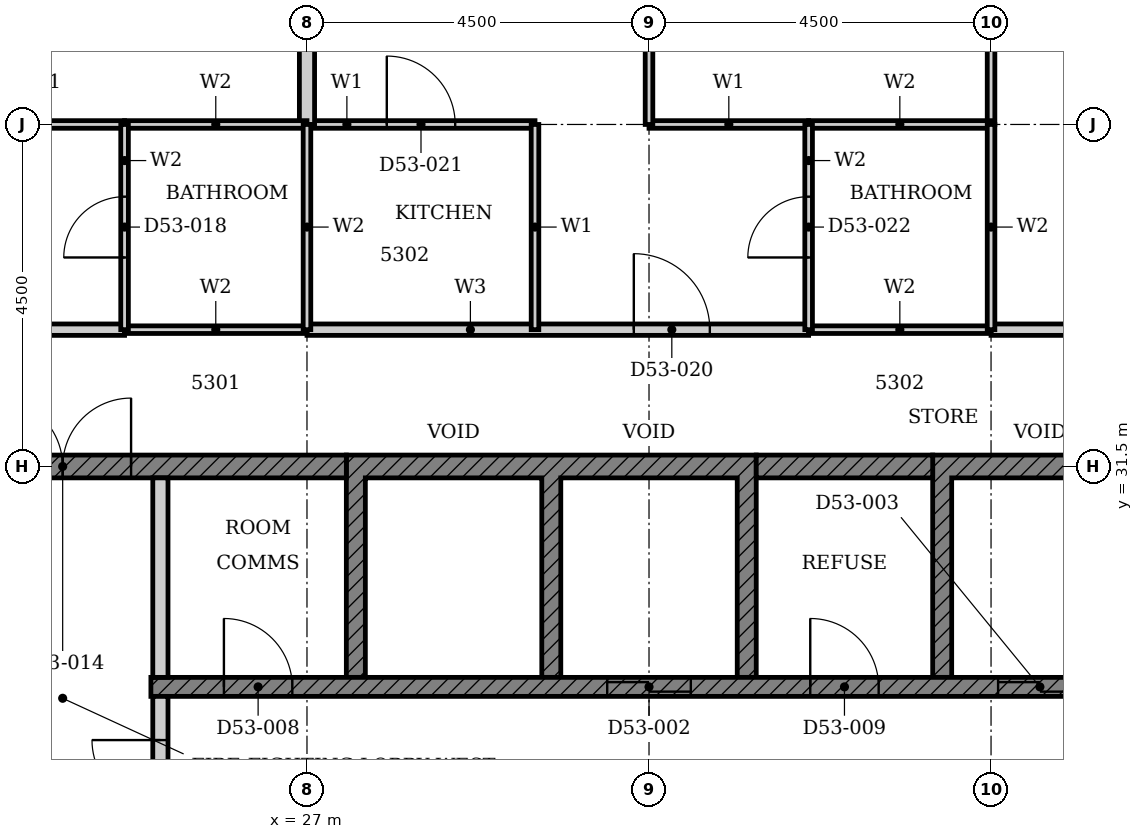
"""IFC4 building model, lengths in metres.
Left out: names, types, materials, properties, quantities, classifications, styles, units other than length and angle.
Written with IfcOpenShell. Run it as: python <this file> out.ifc"""

import sys

from ifc_helpers import new_model, si_unit, direction, frame, frame_2d, origin, place, context, subcontext, project, spatial, polyline, rectangle, outline, extrude, element, fill, save


model = new_model("IFC4")
c1 = context("Model", 3, precision=1e-05, world=origin(), true_north=direction((0.0, 1.0)))
c2 = subcontext(c1, "Body", "Model", "MODEL_VIEW")
j1 = project(units=[si_unit("LENGTHUNIT", "METRE"), si_unit("PLANEANGLEUNIT", "RADIAN")], contexts=[c1])
p1 = place(None, origin())
s1 = spatial("IfcSite", under=j1, at=p1, CompositionType="ELEMENT")
p2 = place(p1, origin())
s2 = spatial("IfcBuilding", under=s1, at=p2, CompositionType="ELEMENT")
p3 = place(p2, frame((0.0, 0.0, 210.9)))
s3 = spatial("IfcBuildingStorey", under=s2, at=p3, CompositionType="ELEMENT", Elevation=210.9)
p4 = place(p3, origin())
e1 = element("IfcWall", 1, at=p4, inside=s3, PredefinedType="SHEAR", context=c2, shape_type="SweptSolid", body=[
    extrude(outline(polyline([(27.518, 28.725), (27.768, 28.725), (27.768, 31.35), (30.089, 31.35), (30.089, 28.725), (30.339, 28.725), (30.339, 31.35), (32.661, 31.35), (32.661, 28.725), (32.911, 28.725), (32.911, 31.65), (27.518, 31.65), (27.518, 28.725)])), origin(), (0.0, 0.0, 1.0), 3.4),
])
p5 = place(p3, origin())
e2 = element("IfcWall", 2, at=p5, inside=s3, PredefinedType="SHEAR", context=c2, shape_type="SweptSolid", body=[
    extrude(outline(polyline([(35.232, 28.725), (35.482, 28.725), (35.482, 31.35), (37.803, 31.35), (37.803, 28.725), (38.053, 28.725), (38.053, 31.35), (40.375, 31.35), (40.375, 28.725), (40.625, 28.725), (40.625, 31.65), (35.232, 31.65), (35.232, 28.725)])), origin(), (0.0, 0.0, 1.0), 3.4),
])
p6 = place(p3, frame((18.15, 31.5, 0.0), z_axis=(0.0, 0.0, 1.0), x_axis=(1.0, 0.0, 0.0)))
e3 = element("IfcWall", 3, at=p6, inside=s3, PredefinedType="SHEAR", context=c2, shape_type="SweptSolid", body=[
    extrude(rectangle(XDim=9.368, YDim=0.3, at=frame_2d((4.684, 0.0))), origin(), (0.0, 0.0, 1.0), 3.4),
])
p7 = place(p6, frame((4.736, 0.0, 0.0)))
e4 = element("IfcOpeningElement", 4, at=p7, cuts=e3, PredefinedType="OPENING", context=c2, shape_type="SweptSolid", body=[
    extrude(rectangle(XDim=1.8, YDim=2.1, at=frame_2d((0.9, 1.05))), frame((0.0, 0.16, 0.0), z_axis=(0.0, -1.0, 0.0), x_axis=(1.0, 0.0, 0.0)), (0.0, 0.0, 1.0), 0.32),
])
p8 = place(p3, frame((32.911, 31.5, 0.0), z_axis=(0.0, 0.0, 1.0), x_axis=(1.0, 0.0, 0.0)))
e5 = element("IfcWall", 5, at=p8, inside=s3, PredefinedType="SHEAR", context=c2, shape_type="SweptSolid", body=[
    extrude(rectangle(XDim=2.322, YDim=0.3, at=frame_2d((1.161, 0.0))), origin(), (0.0, 0.0, 1.0), 3.4),
])
p9 = place(p3, frame((24.947, 28.6, 0.0), z_axis=(0.0, 0.0, 1.0), x_axis=(1.0, 0.0, 0.0)))
e6 = element("IfcWall", 6, at=p9, inside=s3, PredefinedType="SHEAR", context=c2, shape_type="SweptSolid", body=[
    extrude(rectangle(XDim=15.678, YDim=0.25, at=frame_2d((7.839, 0.0))), origin(), (0.0, 0.0, 1.0), 3.4),
])
p10 = place(p9, frame((6.004, 0.0, 0.0)))
e7 = element("IfcOpeningElement", 7, at=p10, cuts=e6, PredefinedType="OPENING", context=c2, shape_type="SweptSolid", body=[
    extrude(rectangle(XDim=1.1, YDim=2.1, at=frame_2d((0.55, 1.05))), frame((0.0, 0.135, 0.0), z_axis=(0.0, -1.0, 0.0), x_axis=(1.0, 0.0, 0.0)), (0.0, 0.0, 1.0), 0.27),
])
p11 = place(p9, frame((11.146, 0.0, 0.0)))
e8 = element("IfcOpeningElement", 8, at=p11, cuts=e6, PredefinedType="OPENING", context=c2, shape_type="SweptSolid", body=[
    extrude(rectangle(XDim=1.1, YDim=2.1, at=frame_2d((0.55, 1.05))), frame((0.0, 0.135, 0.0), z_axis=(0.0, -1.0, 0.0), x_axis=(1.0, 0.0, 0.0)), (0.0, 0.0, 1.0), 0.27),
])
p12 = place(p9, frame((13.718, 0.0, 0.0)))
e9 = element("IfcOpeningElement", 9, at=p12, cuts=e6, PredefinedType="OPENING", context=c2, shape_type="SweptSolid", body=[
    extrude(rectangle(XDim=1.1, YDim=2.1, at=frame_2d((0.55, 1.05))), frame((0.0, 0.135, 0.0), z_axis=(0.0, -1.0, 0.0), x_axis=(1.0, 0.0, 0.0)), (0.0, 0.0, 1.0), 0.27),
])
p13 = place(p9, frame((0.961, 0.0, 0.0)))
e10 = element("IfcOpeningElement", 10, at=p13, cuts=e6, PredefinedType="OPENING", context=c2, shape_type="SweptSolid", body=[
    extrude(rectangle(XDim=0.9, YDim=2.1, at=frame_2d((0.45, 1.05))), frame((0.0, 0.135, 0.0), z_axis=(0.0, -1.0, 0.0), x_axis=(1.0, 0.0, 0.0)), (0.0, 0.0, 1.0), 0.27),
])
p14 = place(p9, frame((8.675, 0.0, 0.0)))
e11 = element("IfcOpeningElement", 11, at=p14, cuts=e6, PredefinedType="OPENING", context=c2, shape_type="SweptSolid", body=[
    extrude(rectangle(XDim=0.9, YDim=2.1, at=frame_2d((0.45, 1.05))), frame((0.0, 0.135, 0.0), z_axis=(0.0, -1.0, 0.0), x_axis=(1.0, 0.0, 0.0)), (0.0, 0.0, 1.0), 0.27),
])
p15 = place(p3, frame((25.072, 28.725, 0.0), z_axis=(0.0, 0.0, 1.0), x_axis=(0.0, 1.0, 0.0)))
e12 = element("IfcWall", 12, at=p15, inside=s3, PredefinedType="PARTITIONING", context=c2, shape_type="SweptSolid", body=[
    extrude(rectangle(XDim=2.625, YDim=0.2, at=frame_2d((1.312, 0.0))), origin(), (0.0, 0.0, 1.0), 3.4),
])
p16 = place(p3, frame((25.072, 25.525, 0.0), z_axis=(0.0, 0.0, 1.0), x_axis=(0.0, 1.0, 0.0)))
e13 = element("IfcWall", 13, at=p16, inside=s3, PredefinedType="PARTITIONING", context=c2, shape_type="SweptSolid", body=[
    extrude(rectangle(XDim=2.95, YDim=0.2, at=frame_2d((1.475, 0.0))), origin(), (0.0, 0.0, 1.0), 3.4),
])
p17 = place(p16, frame((0.575, 0.0, 0.0)))
e14 = element("IfcOpeningElement", 14, at=p17, cuts=e13, PredefinedType="OPENING", context=c2, shape_type="SweptSolid", body=[
    extrude(rectangle(XDim=1.8, YDim=2.1, at=frame_2d((0.9, 1.05))), frame((0.0, 0.11, 0.0), z_axis=(0.0, -1.0, 0.0), x_axis=(1.0, 0.0, 0.0)), (0.0, 0.0, 1.0), 0.22),
])
p18 = place(p3, frame((18.0, 33.3, 0.0), z_axis=(0.0, 0.0, 1.0), x_axis=(1.0, 0.0, 0.0)))
e15 = element("IfcWall", 15, at=p18, inside=s3, PredefinedType="PARTITIONING", context=c2, shape_type="SweptSolid", body=[
    extrude(rectangle(XDim=6.6, YDim=0.15, at=frame_2d((3.3, 0.0))), origin(), (0.0, 0.0, 1.0), 3.4),
])
p19 = place(p18, frame((4.3, 0.0, 0.0)))
e16 = element("IfcOpeningElement", 16, at=p19, cuts=e15, PredefinedType="OPENING", context=c2, shape_type="SweptSolid", body=[
    extrude(rectangle(XDim=1.0, YDim=2.2, at=frame_2d((0.5, 1.1))), frame((0.0, 0.085, 0.0), z_axis=(0.0, -1.0, 0.0), x_axis=(1.0, 0.0, 0.0)), (0.0, 0.0, 1.0), 0.17),
])
p20 = place(p3, frame((27.0, 33.3, 0.0), z_axis=(0.0, 0.0, 1.0), x_axis=(1.0, 0.0, 0.0)))
e17 = element("IfcWall", 17, at=p20, inside=s3, PredefinedType="PARTITIONING", context=c2, shape_type="SweptSolid", body=[
    extrude(rectangle(XDim=6.6, YDim=0.15, at=frame_2d((3.3, 0.0))), origin(), (0.0, 0.0, 1.0), 3.4),
])
p21 = place(p20, frame((4.3, 0.0, 0.0)))
e18 = element("IfcOpeningElement", 18, at=p21, cuts=e17, PredefinedType="OPENING", context=c2, shape_type="SweptSolid", body=[
    extrude(rectangle(XDim=1.0, YDim=2.2, at=frame_2d((0.5, 1.1))), frame((0.0, 0.085, 0.0), z_axis=(0.0, -1.0, 0.0), x_axis=(1.0, 0.0, 0.0)), (0.0, 0.0, 1.0), 0.17),
])
p22 = place(p3, frame((36.0, 33.3, 0.0), z_axis=(0.0, 0.0, 1.0), x_axis=(1.0, 0.0, 0.0)))
e19 = element("IfcWall", 19, at=p22, inside=s3, PredefinedType="PARTITIONING", context=c2, shape_type="SweptSolid", body=[
    extrude(rectangle(XDim=9.0, YDim=0.15, at=frame_2d((4.5, 0.0))), origin(), (0.0, 0.0, 1.0), 3.4),
])
p23 = place(p22, frame((4.0, 0.0, 0.0)))
e20 = element("IfcOpeningElement", 20, at=p23, cuts=e19, PredefinedType="OPENING", context=c2, shape_type="SweptSolid", body=[
    extrude(rectangle(XDim=1.0, YDim=2.1, at=frame_2d((0.5, 1.05))), frame((0.0, 0.085, 0.0), z_axis=(0.0, -1.0, 0.0), x_axis=(1.0, 0.0, 0.0)), (0.0, 0.0, 1.0), 0.17),
])
for number, where, z_axis, x_axis in (
    (21, (22.5, 36.0, 0.0), (0.0, 0.0, 1.0), (1.0, 0.0, 0.0)),
    (22, (31.5, 36.0, 0.0), (0.0, 0.0, 1.0), (1.0, 0.0, 0.0)),
):
    element("IfcWall", number, at=place(p3, frame(where, z_axis=z_axis, x_axis=x_axis)), inside=s3, PredefinedType="PARTITIONING", context=c2, shape_type="SweptSolid", body=[
        extrude(rectangle(XDim=2.1, YDim=0.1, at=frame_2d((1.05, 0.0))), origin(), (0.0, 0.0, 1.0), 3.4),
    ])
p24 = place(p3, frame((27.0, 36.0, 0.0), z_axis=(0.0, 0.0, 1.0), x_axis=(1.0, 0.0, 0.0)))
e23 = element("IfcWall", 23, at=p24, inside=s3, PredefinedType="PARTITIONING", context=c2, shape_type="SweptSolid", body=[
    extrude(rectangle(XDim=3.0, YDim=0.1, at=frame_2d((1.5, 0.0))), origin(), (0.0, 0.0, 1.0), 3.4),
])
p25 = place(p24, frame((1.05, 0.0, 0.0)))
e24 = element("IfcOpeningElement", 24, at=p25, cuts=e23, PredefinedType="OPENING", context=c2, shape_type="SweptSolid", body=[
    extrude(rectangle(XDim=0.9, YDim=2.1, at=frame_2d((0.45, 1.05))), frame((0.0, 0.06, 0.0), z_axis=(0.0, -1.0, 0.0), x_axis=(1.0, 0.0, 0.0)), (0.0, 0.0, 1.0), 0.12),
])
p26 = place(p3, frame((30.0, 33.3, 0.0), z_axis=(0.0, 0.0, 1.0), x_axis=(0.0, 1.0, 0.0)))
e25 = element("IfcWall", 25, at=p26, inside=s3, PredefinedType="PARTITIONING", context=c2, shape_type="SweptSolid", body=[
    extrude(rectangle(XDim=2.7, YDim=0.1, at=frame_2d((1.35, 0.0))), origin(), (0.0, 0.0, 1.0), 3.4),
])
p27 = place(p3, frame((31.5, 36.0, 0.0), z_axis=(0.0, 0.0, 1.0), x_axis=(0.0, 1.0, 0.0)))
e26 = element("IfcWall", 26, at=p27, inside=s3, PredefinedType="PARTITIONING", context=c2, shape_type="SweptSolid", body=[
    extrude(rectangle(XDim=4.79, YDim=0.1, at=frame_2d((2.395, 0.0))), origin(), (0.0, 0.0, 1.0), 3.4),
])
p28 = place(p27, frame((1.8, 0.0, 0.0)))
e27 = element("IfcOpeningElement", 27, at=p28, cuts=e26, PredefinedType="OPENING", context=c2, shape_type="SweptSolid", body=[
    extrude(rectangle(XDim=0.9, YDim=2.1, at=frame_2d((0.45, 1.05))), frame((0.0, 0.06, 0.0), z_axis=(0.0, -1.0, 0.0), x_axis=(1.0, 0.0, 0.0)), (0.0, 0.0, 1.0), 0.12),
])
p29 = place(p3, frame((36.0, 36.0, 0.0), z_axis=(0.0, 0.0, 1.0), x_axis=(0.0, 1.0, 0.0)))
e28 = element("IfcWall", 28, at=p29, inside=s3, PredefinedType="PARTITIONING", context=c2, shape_type="SweptSolid", body=[
    extrude(rectangle(XDim=4.69, YDim=0.1, at=frame_2d((2.345, 0.0))), origin(), (0.0, 0.0, 1.0), 3.4),
])
p30 = place(p3, frame((27.0, 36.0, 0.0), z_axis=(0.0, 0.0, 1.0), x_axis=(0.0, 1.0, 0.0)))
e29 = element("IfcWall", 29, at=p30, inside=s3, PredefinedType="PARTITIONING", context=c2, shape_type="SweptSolid", body=[
    extrude(rectangle(XDim=4.69, YDim=0.2, at=frame_2d((2.345, 0.0))), origin(), (0.0, 0.0, 1.0), 3.4),
])
for number, where, z_axis, x_axis in (
    (30, (24.6, 33.3, 0.0), (0.0, 0.0, 1.0), (1.0, 0.0, 0.0)),
    (31, (33.6, 33.3, 0.0), (0.0, 0.0, 1.0), (1.0, 0.0, 0.0)),
    (32, (24.6, 36.0, 0.0), (0.0, 0.0, 1.0), (1.0, 0.0, 0.0)),
    (33, (33.6, 36.0, 0.0), (0.0, 0.0, 1.0), (1.0, 0.0, 0.0)),
):
    element("IfcWall", number, at=place(p3, frame(where, z_axis=z_axis, x_axis=x_axis)), inside=s3, PredefinedType="PARTITIONING", context=c2, shape_type="SweptSolid", body=[
        extrude(rectangle(XDim=2.4, YDim=0.1, at=frame_2d((1.2, 0.0))), origin(), (0.0, 0.0, 1.0), 3.4),
    ])
p31 = place(p3, frame((24.6, 33.3, 0.0), z_axis=(0.0, 0.0, 1.0), x_axis=(0.0, 1.0, 0.0)))
e34 = element("IfcWall", 34, at=p31, inside=s3, PredefinedType="PARTITIONING", context=c2, shape_type="SweptSolid", body=[
    extrude(rectangle(XDim=2.7, YDim=0.1, at=frame_2d((1.35, 0.0))), origin(), (0.0, 0.0, 1.0), 3.4),
])
p32 = place(p31, frame((0.95, 0.0, 0.0)))
e35 = element("IfcOpeningElement", 35, at=p32, cuts=e34, PredefinedType="OPENING", context=c2, shape_type="SweptSolid", body=[
    extrude(rectangle(XDim=0.8, YDim=2.1, at=frame_2d((0.4, 1.05))), frame((0.0, 0.06, 0.0), z_axis=(0.0, -1.0, 0.0), x_axis=(1.0, 0.0, 0.0)), (0.0, 0.0, 1.0), 0.12),
])
p33 = place(p3, frame((27.0, 33.3, 0.0), z_axis=(0.0, 0.0, 1.0), x_axis=(0.0, 1.0, 0.0)))
e36 = element("IfcWall", 36, at=p33, inside=s3, PredefinedType="PARTITIONING", context=c2, shape_type="SweptSolid", body=[
    extrude(rectangle(XDim=2.7, YDim=0.1, at=frame_2d((1.35, 0.0))), origin(), (0.0, 0.0, 1.0), 3.4),
])
p34 = place(p3, frame((33.6, 33.3, 0.0), z_axis=(0.0, 0.0, 1.0), x_axis=(0.0, 1.0, 0.0)))
e37 = element("IfcWall", 37, at=p34, inside=s3, PredefinedType="PARTITIONING", context=c2, shape_type="SweptSolid", body=[
    extrude(rectangle(XDim=2.7, YDim=0.1, at=frame_2d((1.35, 0.0))), origin(), (0.0, 0.0, 1.0), 3.4),
])
p35 = place(p34, frame((0.95, 0.0, 0.0)))
e38 = element("IfcOpeningElement", 38, at=p35, cuts=e37, PredefinedType="OPENING", context=c2, shape_type="SweptSolid", body=[
    extrude(rectangle(XDim=0.8, YDim=2.1, at=frame_2d((0.4, 1.05))), frame((0.0, 0.06, 0.0), z_axis=(0.0, -1.0, 0.0), x_axis=(1.0, 0.0, 0.0)), (0.0, 0.0, 1.0), 0.12),
])
p36 = place(p3, frame((36.0, 33.3, 0.0), z_axis=(0.0, 0.0, 1.0), x_axis=(0.0, 1.0, 0.0)))
e39 = element("IfcWall", 39, at=p36, inside=s3, PredefinedType="PARTITIONING", context=c2, shape_type="SweptSolid", body=[
    extrude(rectangle(XDim=2.7, YDim=0.1, at=frame_2d((1.35, 0.0))), origin(), (0.0, 0.0, 1.0), 3.4),
])
p37 = place(p10, origin())
e40 = element("IfcDoor", 40, at=p37, inside=s3, OperationType="DOUBLE_DOOR_SLIDING", PredefinedType="DOOR", context=c2, shape_type="SweptSolid", body=[
    extrude(rectangle(XDim=1.1, YDim=2.1, at=frame_2d((0.55, 1.05))), frame((0.0, 0.025, 0.0), z_axis=(0.0, -1.0, 0.0), x_axis=(1.0, 0.0, 0.0)), (0.0, 0.0, 1.0), 0.05),
])
fill(e7, e40)
p38 = place(p11, origin())
e41 = element("IfcDoor", 41, at=p38, inside=s3, OperationType="DOUBLE_DOOR_SLIDING", PredefinedType="DOOR", context=c2, shape_type="SweptSolid", body=[
    extrude(rectangle(XDim=1.1, YDim=2.1, at=frame_2d((0.55, 1.05))), frame((0.0, 0.025, 0.0), z_axis=(0.0, -1.0, 0.0), x_axis=(1.0, 0.0, 0.0)), (0.0, 0.0, 1.0), 0.05),
])
fill(e8, e41)
p39 = place(p13, origin())
e42 = element("IfcDoor", 42, at=p39, inside=s3, OperationType="SINGLE_SWING_LEFT", PredefinedType="DOOR", context=c2, shape_type="SweptSolid", body=[
    extrude(rectangle(XDim=0.9, YDim=2.1, at=frame_2d((0.45, 1.05))), frame((0.0, 0.025, 0.0), z_axis=(0.0, -1.0, 0.0), x_axis=(1.0, 0.0, 0.0)), (0.0, 0.0, 1.0), 0.05),
])
fill(e10, e42)
p40 = place(p14, origin())
e43 = element("IfcDoor", 43, at=p40, inside=s3, OperationType="SINGLE_SWING_LEFT", PredefinedType="DOOR", context=c2, shape_type="SweptSolid", body=[
    extrude(rectangle(XDim=0.9, YDim=2.1, at=frame_2d((0.45, 1.05))), frame((0.0, 0.025, 0.0), z_axis=(0.0, -1.0, 0.0), x_axis=(1.0, 0.0, 0.0)), (0.0, 0.0, 1.0), 0.05),
])
fill(e11, e43)
p41 = place(p17, origin())
e44 = element("IfcDoor", 44, at=p41, inside=s3, OperationType="DOUBLE_DOOR_SINGLE_SWING", PredefinedType="DOOR", context=c2, shape_type="SweptSolid", body=[
    extrude(rectangle(XDim=1.8, YDim=2.1, at=frame_2d((0.9, 1.05))), frame((0.0, 0.025, 0.0), z_axis=(0.0, -1.0, 0.0), x_axis=(1.0, 0.0, 0.0)), (0.0, 0.0, 1.0), 0.05),
])
fill(e14, e44)
p42 = place(p7, origin())
e45 = element("IfcDoor", 45, at=p42, inside=s3, OperationType="DOUBLE_DOOR_SINGLE_SWING", PredefinedType="DOOR", context=c2, shape_type="SweptSolid", body=[
    extrude(rectangle(XDim=1.8, YDim=2.1, at=frame_2d((0.9, 1.05))), frame((0.0, 0.025, 0.0), z_axis=(0.0, -1.0, 0.0), x_axis=(1.0, 0.0, 0.0)), (0.0, 0.0, 1.0), 0.05),
])
fill(e4, e45)
p43 = place(p32, origin())
e46 = element("IfcDoor", 46, at=p43, inside=s3, OperationType="SINGLE_SWING_RIGHT", PredefinedType="DOOR", context=c2, shape_type="SweptSolid", body=[
    extrude(rectangle(XDim=0.8, YDim=2.1, at=frame_2d((0.4, 1.05))), frame((0.0, 0.025, 0.0), z_axis=(0.0, -1.0, 0.0), x_axis=(1.0, 0.0, 0.0)), (0.0, 0.0, 1.0), 0.05),
])
fill(e35, e46)
p44 = place(p21, origin())
e47 = element("IfcDoor", 47, at=p44, inside=s3, OperationType="SINGLE_SWING_RIGHT", PredefinedType="DOOR", context=c2, shape_type="SweptSolid", body=[
    extrude(rectangle(XDim=1.0, YDim=2.2, at=frame_2d((0.5, 1.1))), frame((0.0, 0.025, 0.0), z_axis=(0.0, -1.0, 0.0), x_axis=(1.0, 0.0, 0.0)), (0.0, 0.0, 1.0), 0.05),
])
fill(e18, e47)
p45 = place(p25, origin())
e48 = element("IfcDoor", 48, at=p45, inside=s3, OperationType="SINGLE_SWING_RIGHT", PredefinedType="DOOR", context=c2, shape_type="SweptSolid", body=[
    extrude(rectangle(XDim=0.9, YDim=2.1, at=frame_2d((0.45, 1.05))), frame((0.0, 0.025, 0.0), z_axis=(0.0, -1.0, 0.0), x_axis=(1.0, 0.0, 0.0)), (0.0, 0.0, 1.0), 0.05),
])
fill(e24, e48)
p46 = place(p35, origin())
e49 = element("IfcDoor", 49, at=p46, inside=s3, OperationType="SINGLE_SWING_LEFT", PredefinedType="DOOR", context=c2, shape_type="SweptSolid", body=[
    extrude(rectangle(XDim=0.8, YDim=2.1, at=frame_2d((0.4, 1.05))), frame((0.0, 0.025, 0.0), z_axis=(0.0, -1.0, 0.0), x_axis=(1.0, 0.0, 0.0)), (0.0, 0.0, 1.0), 0.05),
])
fill(e38, e49)
save(model, sys.argv[1])
